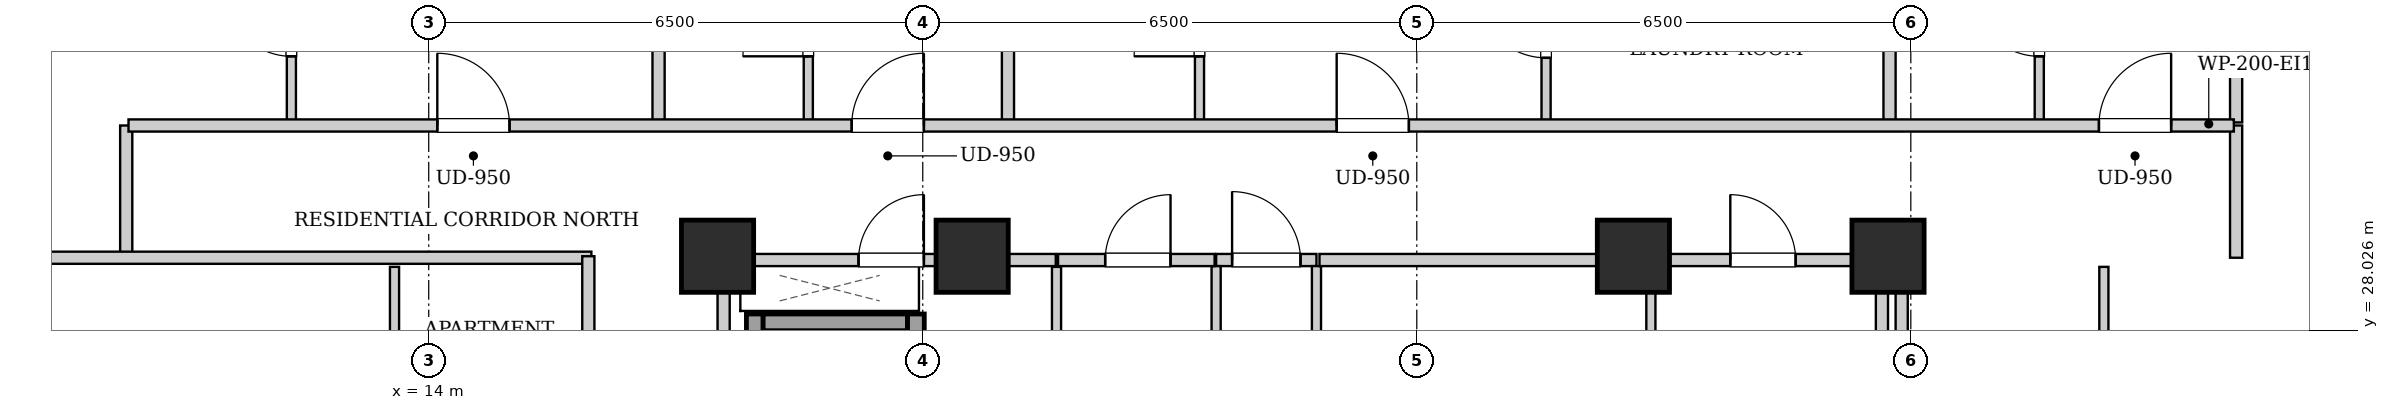
"""IFC4 building model, lengths in metres.
Left out: names, types, materials, properties, quantities, classifications, styles, units other than length and angle.
Written with IfcOpenShell. Run it as: python <this file> out.ifc"""

import sys

from ifc_helpers import new_model, si_unit, direction, frame, frame_2d, origin, origin_2d, place, context, subcontext, project, spatial, rectangle, extrude, element, fill, save


model = new_model("IFC4")
c1 = context("Model", 3, precision=1e-05, world=origin(), true_north=direction((0.0, 1.0)))
c2 = subcontext(c1, "Body", "Model", "MODEL_VIEW")
j1 = project(units=[si_unit("LENGTHUNIT", "METRE"), si_unit("PLANEANGLEUNIT", "RADIAN")], contexts=[c1])
p1 = place(None, origin())
s1 = spatial("IfcSite", under=j1, at=p1, CompositionType="ELEMENT")
p2 = place(p1, origin())
s2 = spatial("IfcBuilding", under=s1, at=p2, CompositionType="ELEMENT")
p3 = place(p2, frame((0.0, 0.0, 147.15)))
s3 = spatial("IfcBuildingStorey", under=s2, at=p3, CompositionType="ELEMENT", Elevation=147.15)
for number, where, z_axis, x_axis in (
    (1, (17.8, 29.0, 0.0), (0.0, 0.0, 1.0), (1.0, 0.0, 0.0)),
    (2, (21.15, 29.0, 0.0), (0.0, 0.0, 1.0), (1.0, 0.0, 0.0)),
    (3, (29.85, 29.0, 0.0), (0.0, 0.0, 1.0), (1.0, 0.0, 0.0)),
    (4, (33.2, 29.0, 0.0), (0.0, 0.0, 1.0), (1.0, 0.0, 0.0)),
):
    element("IfcColumn", number, at=place(p3, frame(where, z_axis=z_axis, x_axis=x_axis)), inside=s3, PredefinedType="COLUMN", context=c2, shape_type="SweptSolid", body=[
        extrude(rectangle(XDim=0.95, YDim=0.95, at=origin_2d()), origin(), (0.0, 0.0, 1.0), 3.25),
    ])
p4 = place(p3, frame((18.29, 24.1, 0.0), z_axis=(0.0, 0.0, 1.0), x_axis=(0.0, 1.0, 0.0)))
e5 = element("IfcWall", 5, at=p4, inside=s3, PredefinedType="SHEAR", context=c2, shape_type="SweptSolid", body=[
    extrude(rectangle(XDim=4.14, YDim=0.22, at=frame_2d((2.07, 0.0))), origin(), (0.0, 0.0, 1.0), 2.99),
])
p5 = place(p3, frame((18.4, 28.13, 0.0), z_axis=(0.0, 0.0, 1.0), x_axis=(1.0, 0.0, 0.0)))
e6 = element("IfcWall", 6, at=p5, inside=s3, PredefinedType="SHEAR", context=c2, shape_type="SweptSolid", body=[
    extrude(rectangle(XDim=1.9, YDim=0.22, at=frame_2d((0.95, 0.0))), origin(), (0.0, 0.0, 1.0), 2.99),
])
p6 = place(p3, frame((20.41, 26.06, 0.0), z_axis=(0.0, 0.0, 1.0), x_axis=(0.0, 1.0, 0.0)))
e7 = element("IfcWall", 7, at=p6, inside=s3, PredefinedType="SHEAR", context=c2, shape_type="SweptSolid", body=[
    extrude(rectangle(XDim=2.18, YDim=0.22, at=frame_2d((1.09, 0.0))), origin(), (0.0, 0.0, 1.0), 2.99),
])
for number, where, z_axis, x_axis in (
    (8, (17.88, 24.12, 0.0), (0.0, 0.0, 1.0), (0.0, 1.0, 0.0)),
    (9, (33.12, 24.12, 0.0), (0.0, 0.0, 1.0), (0.0, 1.0, 0.0)),
):
    element("IfcWall", number, at=place(p3, frame(where, z_axis=z_axis, x_axis=x_axis)), inside=s3, PredefinedType="PARTITIONING", context=c2, shape_type="SweptSolid", body=[
        extrude(rectangle(XDim=4.76, YDim=0.16, at=frame_2d((2.38, 0.0))), origin(), (0.0, 0.0, 1.0), 2.325),
    ])
p7 = place(p3, frame((24.36, 28.95, 0.0), z_axis=(0.0, 0.0, 1.0), x_axis=(1.0, 0.0, 0.0)))
e10 = element("IfcWall", 10, at=p7, inside=s3, PredefinedType="PARTITIONING", context=c2, shape_type="SweptSolid", body=[
    extrude(rectangle(XDim=1.32, YDim=0.16, at=frame_2d((0.66, 0.0))), origin(), (0.0, 0.0, 1.0), 2.442),
])
p8 = place(p7, frame((0.21, 0.0, 0.0)))
e11 = element("IfcOpeningElement", 11, at=p8, cuts=e10, PredefinedType="OPENING", context=c2, shape_type="SweptSolid", body=[
    extrude(rectangle(XDim=0.9, YDim=2.05, at=frame_2d((0.45, 1.025))), frame((0.0, 0.09, 0.0), z_axis=(0.0, -1.0, 0.0), x_axis=(1.0, 0.0, 0.0)), (0.0, 0.0, 1.0), 0.18),
])
p9 = place(p3, frame((17.96, 28.95, 0.0), z_axis=(0.0, 0.0, 1.0), x_axis=(1.0, 0.0, 0.0)))
e12 = element("IfcWall", 12, at=p9, inside=s3, PredefinedType="PARTITIONING", context=c2, shape_type="SweptSolid", body=[
    extrude(rectangle(XDim=4.29, YDim=0.16, at=frame_2d((2.145, 0.0))), origin(), (0.0, 0.0, 1.0), 2.442),
])
p10 = place(p9, frame((1.695, 0.0, 0.0)))
e13 = element("IfcOpeningElement", 13, at=p10, cuts=e12, PredefinedType="OPENING", context=c2, shape_type="SweptSolid", body=[
    extrude(rectangle(XDim=0.86, YDim=2.05, at=frame_2d((0.43, 1.025))), frame((0.0, 0.09, 0.0), z_axis=(0.0, -1.0, 0.0), x_axis=(1.0, 0.0, 0.0)), (0.0, 0.0, 1.0), 0.18),
])
for number, where, z_axis, x_axis in (
    (14, (24.36, 25.0, 0.0), (0.0, 0.0, 1.0), (0.0, 1.0, 0.0)),
    (15, (25.68, 25.0, 0.0), (0.0, 0.0, 1.0), (0.0, 1.0, 0.0)),
):
    element("IfcWall", number, at=place(p3, frame(where, z_axis=z_axis, x_axis=x_axis)), inside=s3, PredefinedType="PARTITIONING", context=c2, shape_type="SweptSolid", body=[
        extrude(rectangle(XDim=3.87, YDim=0.12, at=frame_2d((1.935, 0.0))), origin(), (0.0, 0.0, 1.0), 2.99),
    ])
p11 = place(p3, frame((30.08, 26.18, 0.0), z_axis=(0.0, 0.0, 1.0), x_axis=(0.0, 1.0, 0.0)))
e16 = element("IfcWall", 16, at=p11, inside=s3, PredefinedType="PARTITIONING", context=c2, shape_type="SweptSolid", body=[
    extrude(rectangle(XDim=2.68, YDim=0.12, at=frame_2d((1.34, 0.0))), origin(), (0.0, 0.0, 1.0), 2.99),
])
p12 = place(p3, frame((30.08, 28.95, 0.0), z_axis=(0.0, 0.0, 1.0), x_axis=(1.0, 0.0, 0.0)))
e17 = element("IfcWall", 17, at=p12, inside=s3, PredefinedType="PARTITIONING", context=c2, shape_type="SweptSolid", body=[
    extrude(rectangle(XDim=2.96, YDim=0.16, at=frame_2d((1.48, 0.0))), origin(), (0.0, 0.0, 1.0), 2.99),
])
p13 = place(p12, frame((1.045, 0.0, 0.0)))
e18 = element("IfcOpeningElement", 18, at=p13, cuts=e17, PredefinedType="OPENING", context=c2, shape_type="SweptSolid", body=[
    extrude(rectangle(XDim=0.86, YDim=2.05, at=frame_2d((0.43, 1.025))), frame((0.0, 0.09, 0.0), z_axis=(0.0, -1.0, 0.0), x_axis=(1.0, 0.0, 0.0)), (0.0, 0.0, 1.0), 0.18),
])
p14 = place(p3, frame((22.26, 25.0, 0.0), z_axis=(0.0, 0.0, 1.0), x_axis=(0.0, 1.0, 0.0)))
e19 = element("IfcWall", 19, at=p14, inside=s3, PredefinedType="PARTITIONING", context=c2, shape_type="SweptSolid", body=[
    extrude(rectangle(XDim=3.86, YDim=0.12, at=frame_2d((1.93, 0.0))), origin(), (0.0, 0.0, 1.0), 2.99),
])
p15 = place(p3, frame((22.28, 28.95, 0.0), z_axis=(0.0, 0.0, 1.0), x_axis=(1.0, 0.0, 0.0)))
e20 = element("IfcWall", 20, at=p15, inside=s3, PredefinedType="PARTITIONING", context=c2, shape_type="SweptSolid", body=[
    extrude(rectangle(XDim=2.06, YDim=0.16, at=frame_2d((1.03, 0.0))), origin(), (0.0, 0.0, 1.0), 2.442),
])
p16 = place(p15, frame((0.62, 0.0, 0.0)))
e21 = element("IfcOpeningElement", 21, at=p16, cuts=e20, PredefinedType="OPENING", context=c2, shape_type="SweptSolid", body=[
    extrude(rectangle(XDim=0.86, YDim=2.05, at=frame_2d((0.43, 1.025))), frame((0.0, 0.09, 0.0), z_axis=(0.0, -1.0, 0.0), x_axis=(1.0, 0.0, 0.0)), (0.0, 0.0, 1.0), 0.18),
])
p17 = place(p3, frame((25.72, 28.95, 0.0), z_axis=(0.0, 0.0, 1.0), x_axis=(1.0, 0.0, 0.0)))
e22 = element("IfcWall", 22, at=p17, inside=s3, PredefinedType="PARTITIONING", context=c2, shape_type="SweptSolid", body=[
    extrude(rectangle(XDim=4.32, YDim=0.16, at=frame_2d((2.16, 0.0))), origin(), (0.0, 0.0, 1.0), 2.442),
])
for number, where, z_axis, x_axis in (
    (23, (10.02, 28.98, 0.0), (0.0, 0.0, 1.0), (0.0, 1.0, 0.0)),
    (24, (37.78, 28.98, 0.0), (0.0, 0.0, 1.0), (0.0, 1.0, 0.0)),
):
    element("IfcWall", number, at=place(p3, frame(where, z_axis=z_axis, x_axis=x_axis)), inside=s3, PredefinedType="PARTITIONING", context=c2, shape_type="SweptSolid", body=[
        extrude(rectangle(XDim=1.74, YDim=0.16, at=frame_2d((0.87, 0.0))), origin(), (0.0, 0.0, 1.0), 2.99),
    ])
p18 = place(p3, frame((7.78, 28.98, 0.0), z_axis=(0.0, 0.0, 1.0), x_axis=(1.0, 0.0, 0.0)))
e25 = element("IfcWall", 25, at=p18, inside=s3, PredefinedType="PARTITIONING", context=c2, shape_type="SweptSolid", body=[
    extrude(rectangle(XDim=8.36, YDim=0.16, at=frame_2d((4.18, 0.0))), origin(), (0.0, 0.0, 1.0), 2.442),
])
p19 = place(p3, frame((12.193, 30.76, 0.0), z_axis=(0.0, 0.0, 1.0), x_axis=(0.0, 1.0, 0.0)))
e26 = element("IfcWall", 26, at=p19, inside=s3, PredefinedType="PARTITIONING", context=c2, shape_type="SweptSolid", body=[
    extrude(rectangle(XDim=2.6, YDim=0.12, at=frame_2d((1.3, 0.0))), origin(), (0.0, 0.0, 1.0), 2.99),
])
p20 = place(p19, frame((0.87, 0.0, 0.0)))
e27 = element("IfcOpeningElement", 27, at=p20, cuts=e26, PredefinedType="OPENING", context=c2, shape_type="SweptSolid", body=[
    extrude(rectangle(XDim=0.86, YDim=2.05, at=frame_2d((0.43, 1.025))), frame((0.0, 0.07, 0.0), z_axis=(0.0, -1.0, 0.0), x_axis=(1.0, 0.0, 0.0)), (0.0, 0.0, 1.0), 0.14),
])
p21 = place(p3, frame((17.024, 30.76, 0.0), z_axis=(0.0, 0.0, 1.0), x_axis=(0.0, 1.0, 0.0)))
e28 = element("IfcWall", 28, at=p21, inside=s3, PredefinedType="PARTITIONING", context=c2, shape_type="SweptSolid", body=[
    extrude(rectangle(XDim=12.26, YDim=0.16, at=frame_2d((6.13, 0.0))), origin(), (0.0, 0.0, 1.0), 2.99),
])
p22 = place(p3, frame((18.994, 30.76, 0.0), z_axis=(0.0, 0.0, 1.0), x_axis=(0.0, 1.0, 0.0)))
e29 = element("IfcWall", 29, at=p22, inside=s3, PredefinedType="PARTITIONING", context=c2, shape_type="SweptSolid", body=[
    extrude(rectangle(XDim=2.6, YDim=0.12, at=frame_2d((1.3, 0.0))), origin(), (0.0, 0.0, 1.0), 2.99),
])
p23 = place(p22, frame((0.87, 0.0, 0.0)))
e30 = element("IfcOpeningElement", 30, at=p23, cuts=e29, PredefinedType="OPENING", context=c2, shape_type="SweptSolid", body=[
    extrude(rectangle(XDim=0.86, YDim=2.05, at=frame_2d((0.43, 1.025))), frame((0.0, 0.07, 0.0), z_axis=(0.0, -1.0, 0.0), x_axis=(1.0, 0.0, 0.0)), (0.0, 0.0, 1.0), 0.14),
])
p24 = place(p3, frame((21.621, 30.76, 0.0), z_axis=(0.0, 0.0, 1.0), x_axis=(0.0, 1.0, 0.0)))
e31 = element("IfcWall", 31, at=p24, inside=s3, PredefinedType="PARTITIONING", context=c2, shape_type="SweptSolid", body=[
    extrude(rectangle(XDim=12.26, YDim=0.16, at=frame_2d((6.13, 0.0))), origin(), (0.0, 0.0, 1.0), 2.99),
])
p25 = place(p3, frame((24.141, 30.76, 0.0), z_axis=(0.0, 0.0, 1.0), x_axis=(0.0, 1.0, 0.0)))
e32 = element("IfcWall", 32, at=p25, inside=s3, PredefinedType="PARTITIONING", context=c2, shape_type="SweptSolid", body=[
    extrude(rectangle(XDim=2.6, YDim=0.12, at=frame_2d((1.3, 0.0))), origin(), (0.0, 0.0, 1.0), 2.99),
])
p26 = place(p25, frame((0.87, 0.0, 0.0)))
e33 = element("IfcOpeningElement", 33, at=p26, cuts=e32, PredefinedType="OPENING", context=c2, shape_type="SweptSolid", body=[
    extrude(rectangle(XDim=0.86, YDim=2.05, at=frame_2d((0.43, 1.025))), frame((0.0, 0.07, 0.0), z_axis=(0.0, -1.0, 0.0), x_axis=(1.0, 0.0, 0.0)), (0.0, 0.0, 1.0), 0.14),
])
p27 = place(p3, frame((28.701, 30.76, 0.0), z_axis=(0.0, 0.0, 1.0), x_axis=(0.0, 1.0, 0.0)))
e34 = element("IfcWall", 34, at=p27, inside=s3, PredefinedType="PARTITIONING", context=c2, shape_type="SweptSolid", body=[
    extrude(rectangle(XDim=2.6, YDim=0.12, at=frame_2d((1.3, 0.0))), origin(), (0.0, 0.0, 1.0), 2.99),
])
p28 = place(p27, frame((0.85, 0.0, 0.0)))
e35 = element("IfcOpeningElement", 35, at=p28, cuts=e34, PredefinedType="OPENING", context=c2, shape_type="SweptSolid", body=[
    extrude(rectangle(XDim=0.9, YDim=2.05, at=frame_2d((0.45, 1.025))), frame((0.0, 0.07, 0.0), z_axis=(0.0, -1.0, 0.0), x_axis=(1.0, 0.0, 0.0)), (0.0, 0.0, 1.0), 0.14),
])
p29 = place(p3, frame((37.78, 30.76, 0.0), z_axis=(0.0, 0.0, 1.0), x_axis=(0.0, 1.0, 0.0)))
e36 = element("IfcWall", 36, at=p29, inside=s3, PredefinedType="PARTITIONING", context=c2, shape_type="SweptSolid", body=[
    extrude(rectangle(XDim=2.66, YDim=0.16, at=frame_2d((1.33, 0.0))), origin(), (0.0, 0.0, 1.0), 2.99),
])
p30 = place(p3, frame((33.22, 30.76, 0.0), z_axis=(0.0, 0.0, 1.0), x_axis=(0.0, 1.0, 0.0)))
e37 = element("IfcWall", 37, at=p30, inside=s3, PredefinedType="PARTITIONING", context=c2, shape_type="SweptSolid", body=[
    extrude(rectangle(XDim=10.28, YDim=0.16, at=frame_2d((5.14, 0.0))), origin(), (0.0, 0.0, 1.0), 2.442),
])
p31 = place(p3, frame((35.19, 30.76, 0.0), z_axis=(0.0, 0.0, 1.0), x_axis=(0.0, 1.0, 0.0)))
e38 = element("IfcWall", 38, at=p31, inside=s3, PredefinedType="PARTITIONING", context=c2, shape_type="SweptSolid", body=[
    extrude(rectangle(XDim=2.6, YDim=0.12, at=frame_2d((1.3, 0.0))), origin(), (0.0, 0.0, 1.0), 2.99),
])
p32 = place(p31, frame((0.87, 0.0, 0.0)))
e39 = element("IfcOpeningElement", 39, at=p32, cuts=e38, PredefinedType="OPENING", context=c2, shape_type="SweptSolid", body=[
    extrude(rectangle(XDim=0.86, YDim=2.05, at=frame_2d((0.43, 1.025))), frame((0.0, 0.07, 0.0), z_axis=(0.0, -1.0, 0.0), x_axis=(1.0, 0.0, 0.0)), (0.0, 0.0, 1.0), 0.14),
])
p33 = place(p3, frame((13.55, 23.527, 0.0), z_axis=(0.0, 0.0, 1.0), x_axis=(0.0, 1.0, 0.0)))
e40 = element("IfcWall", 40, at=p33, inside=s3, PredefinedType="PARTITIONING", context=c2, shape_type="SweptSolid", body=[
    extrude(rectangle(XDim=5.333, YDim=0.12, at=frame_2d((2.667, 0.0))), origin(), (0.0, 0.0, 1.0), 2.99),
])
p34 = place(p33, frame((2.216, 0.0, 0.0)))
e41 = element("IfcOpeningElement", 41, at=p34, cuts=e40, PredefinedType="OPENING", context=c2, shape_type="SweptSolid", body=[
    extrude(rectangle(XDim=0.9, YDim=2.05, at=frame_2d((0.45, 1.025))), frame((0.0, 0.07, 0.0), z_axis=(0.0, -1.0, 0.0), x_axis=(1.0, 0.0, 0.0)), (0.0, 0.0, 1.0), 0.14),
])
p35 = place(p3, frame((36.04, 24.552, 0.0), z_axis=(0.0, 0.0, 1.0), x_axis=(0.0, 1.0, 0.0)))
e42 = element("IfcWall", 42, at=p35, inside=s3, PredefinedType="PARTITIONING", context=c2, shape_type="SweptSolid", body=[
    extrude(rectangle(XDim=4.308, YDim=0.12, at=frame_2d((2.154, 0.0))), origin(), (0.0, 0.0, 1.0), 2.99),
])
p36 = place(p35, frame((1.704, 0.0, 0.0)))
e43 = element("IfcOpeningElement", 43, at=p36, cuts=e42, PredefinedType="OPENING", context=c2, shape_type="SweptSolid", body=[
    extrude(rectangle(XDim=0.9, YDim=2.05, at=frame_2d((0.45, 1.025))), frame((0.0, 0.07, 0.0), z_axis=(0.0, -1.0, 0.0), x_axis=(1.0, 0.0, 0.0)), (0.0, 0.0, 1.0), 0.14),
])
p37 = place(p3, frame((10.05, 30.72, 0.0), z_axis=(0.0, 0.0, 1.0), x_axis=(1.0, 0.0, 0.0)))
e44 = element("IfcWall", 44, at=p37, inside=s3, PredefinedType="PARTITIONING", context=c2, shape_type="SweptSolid", body=[
    extrude(rectangle(XDim=27.7, YDim=0.16, at=frame_2d((13.85, 0.0))), origin(), (0.0, 0.0, 1.0), 2.99),
])
p38 = place(p37, frame((4.063, 0.0, 0.0)))
e45 = element("IfcOpeningElement", 45, at=p38, cuts=e44, PredefinedType="OPENING", context=c2, shape_type="SweptSolid", body=[
    extrude(rectangle(XDim=0.95, YDim=2.1, at=frame_2d((0.475, 1.05))), frame((0.0, 0.09, 0.0), z_axis=(0.0, -1.0, 0.0), x_axis=(1.0, 0.0, 0.0)), (0.0, 0.0, 1.0), 0.18),
])
p39 = place(p37, frame((9.515, 0.0, 0.0)))
e46 = element("IfcOpeningElement", 46, at=p39, cuts=e44, PredefinedType="OPENING", context=c2, shape_type="SweptSolid", body=[
    extrude(rectangle(XDim=0.95, YDim=2.1, at=frame_2d((0.475, 1.05))), frame((0.0, 0.09, 0.0), z_axis=(0.0, -1.0, 0.0), x_axis=(1.0, 0.0, 0.0)), (0.0, 0.0, 1.0), 0.18),
])
p40 = place(p37, frame((15.896, 0.0, 0.0)))
e47 = element("IfcOpeningElement", 47, at=p40, cuts=e44, PredefinedType="OPENING", context=c2, shape_type="SweptSolid", body=[
    extrude(rectangle(XDim=0.95, YDim=2.1, at=frame_2d((0.475, 1.05))), frame((0.0, 0.09, 0.0), z_axis=(0.0, -1.0, 0.0), x_axis=(1.0, 0.0, 0.0)), (0.0, 0.0, 1.0), 0.18),
])
p41 = place(p37, frame((25.925, 0.0, 0.0)))
e48 = element("IfcOpeningElement", 48, at=p41, cuts=e44, PredefinedType="OPENING", context=c2, shape_type="SweptSolid", body=[
    extrude(rectangle(XDim=0.95, YDim=2.1, at=frame_2d((0.475, 1.05))), frame((0.0, 0.09, 0.0), z_axis=(0.0, -1.0, 0.0), x_axis=(1.0, 0.0, 0.0)), (0.0, 0.0, 1.0), 0.18),
])
p42 = place(p3, frame((16.1, 15.07, 0.0), z_axis=(0.0, 0.0, 1.0), x_axis=(0.0, 1.0, 0.0)))
e49 = element("IfcWall", 49, at=p42, inside=s3, PredefinedType="PARTITIONING", context=c2, shape_type="SweptSolid", body=[
    extrude(rectangle(XDim=13.93, YDim=0.16, at=frame_2d((6.965, 0.0))), origin(), (0.0, 0.0, 1.0), 2.99),
])
p43 = place(p42, frame((3.608, 0.0, 0.0)))
e50 = element("IfcOpeningElement", 50, at=p43, cuts=e49, PredefinedType="OPENING", context=c2, shape_type="SweptSolid", body=[
    extrude(rectangle(XDim=0.95, YDim=2.1, at=frame_2d((0.475, 1.05))), frame((0.0, 0.09, 0.0), z_axis=(0.0, -1.0, 0.0), x_axis=(1.0, 0.0, 0.0)), (0.0, 0.0, 1.0), 0.18),
])
p44 = place(p42, frame((10.649, 0.0, 0.0)))
e51 = element("IfcOpeningElement", 51, at=p44, cuts=e49, PredefinedType="OPENING", context=c2, shape_type="SweptSolid", body=[
    extrude(rectangle(XDim=0.95, YDim=2.1, at=frame_2d((0.475, 1.05))), frame((0.0, 0.09, 0.0), z_axis=(0.0, -1.0, 0.0), x_axis=(1.0, 0.0, 0.0)), (0.0, 0.0, 1.0), 0.18),
])
p45 = place(p3, frame((33.38, 15.02, 0.0), z_axis=(0.0, 0.0, 1.0), x_axis=(0.0, 1.0, 0.0)))
e52 = element("IfcWall", 52, at=p45, inside=s3, PredefinedType="PARTITIONING", context=c2, shape_type="SweptSolid", body=[
    extrude(rectangle(XDim=13.98, YDim=0.16, at=frame_2d((6.99, 0.0))), origin(), (0.0, 0.0, 1.0), 2.325),
])
p46 = place(p8, origin())
e53 = element("IfcDoor", 53, at=p46, inside=s3, OperationType="SINGLE_SWING_LEFT", PredefinedType="DOOR", context=c2, shape_type="SweptSolid", body=[
    extrude(rectangle(XDim=0.9, YDim=2.05, at=frame_2d((0.45, 1.025))), frame((0.0, 0.025, 0.0), z_axis=(0.0, -1.0, 0.0), x_axis=(1.0, 0.0, 0.0)), (0.0, 0.0, 1.0), 0.05),
])
fill(e11, e53)
p47 = place(p10, origin())
e54 = element("IfcDoor", 54, at=p47, inside=s3, OperationType="SINGLE_SWING_RIGHT", PredefinedType="DOOR", context=c2, shape_type="SweptSolid", body=[
    extrude(rectangle(XDim=0.86, YDim=2.05, at=frame_2d((0.43, 1.025))), frame((0.0, 0.025, 0.0), z_axis=(0.0, -1.0, 0.0), x_axis=(1.0, 0.0, 0.0)), (0.0, 0.0, 1.0), 0.05),
])
fill(e13, e54)
p48 = place(p13, origin())
e55 = element("IfcDoor", 55, at=p48, inside=s3, OperationType="SINGLE_SWING_LEFT", PredefinedType="DOOR", context=c2, shape_type="SweptSolid", body=[
    extrude(rectangle(XDim=0.86, YDim=2.05, at=frame_2d((0.43, 1.025))), frame((0.0, 0.025, 0.0), z_axis=(0.0, -1.0, 0.0), x_axis=(1.0, 0.0, 0.0)), (0.0, 0.0, 1.0), 0.05),
])
fill(e18, e55)
p49 = place(p16, origin())
e56 = element("IfcDoor", 56, at=p49, inside=s3, OperationType="SINGLE_SWING_RIGHT", PredefinedType="DOOR", context=c2, shape_type="SweptSolid", body=[
    extrude(rectangle(XDim=0.86, YDim=2.05, at=frame_2d((0.43, 1.025))), frame((0.0, 0.025, 0.0), z_axis=(0.0, -1.0, 0.0), x_axis=(1.0, 0.0, 0.0)), (0.0, 0.0, 1.0), 0.05),
])
fill(e21, e56)
p50 = place(p20, origin())
e57 = element("IfcDoor", 57, at=p50, inside=s3, OperationType="SINGLE_SWING_RIGHT", PredefinedType="DOOR", context=c2, shape_type="SweptSolid", body=[
    extrude(rectangle(XDim=0.86, YDim=2.05, at=frame_2d((0.43, 1.025))), frame((0.0, 0.025, 0.0), z_axis=(0.0, -1.0, 0.0), x_axis=(1.0, 0.0, 0.0)), (0.0, 0.0, 1.0), 0.05),
])
fill(e27, e57)
p51 = place(p23, origin())
e58 = element("IfcDoor", 58, at=p51, inside=s3, OperationType="SINGLE_SWING_LEFT", PredefinedType="DOOR", context=c2, shape_type="SweptSolid", body=[
    extrude(rectangle(XDim=0.86, YDim=2.05, at=frame_2d((0.43, 1.025))), frame((0.0, 0.025, 0.0), z_axis=(0.0, -1.0, 0.0), x_axis=(1.0, 0.0, 0.0)), (0.0, 0.0, 1.0), 0.05),
])
fill(e30, e58)
p52 = place(p26, origin())
e59 = element("IfcDoor", 59, at=p52, inside=s3, OperationType="SINGLE_SWING_LEFT", PredefinedType="DOOR", context=c2, shape_type="SweptSolid", body=[
    extrude(rectangle(XDim=0.86, YDim=2.05, at=frame_2d((0.43, 1.025))), frame((0.0, 0.025, 0.0), z_axis=(0.0, -1.0, 0.0), x_axis=(1.0, 0.0, 0.0)), (0.0, 0.0, 1.0), 0.05),
])
fill(e33, e59)
p53 = place(p28, origin())
e60 = element("IfcDoor", 60, at=p53, inside=s3, OperationType="SINGLE_SWING_RIGHT", PredefinedType="DOOR", context=c2, shape_type="SweptSolid", body=[
    extrude(rectangle(XDim=0.9, YDim=2.05, at=frame_2d((0.45, 1.025))), frame((0.0, 0.025, 0.0), z_axis=(0.0, -1.0, 0.0), x_axis=(1.0, 0.0, 0.0)), (0.0, 0.0, 1.0), 0.05),
])
fill(e35, e60)
p54 = place(p32, origin())
e61 = element("IfcDoor", 61, at=p54, inside=s3, OperationType="SINGLE_SWING_RIGHT", PredefinedType="DOOR", context=c2, shape_type="SweptSolid", body=[
    extrude(rectangle(XDim=0.86, YDim=2.05, at=frame_2d((0.43, 1.025))), frame((0.0, 0.025, 0.0), z_axis=(0.0, -1.0, 0.0), x_axis=(1.0, 0.0, 0.0)), (0.0, 0.0, 1.0), 0.05),
])
fill(e39, e61)
p55 = place(p38, origin())
e62 = element("IfcDoor", 62, at=p55, inside=s3, OperationType="SINGLE_SWING_LEFT", PredefinedType="DOOR", context=c2, shape_type="SweptSolid", body=[
    extrude(rectangle(XDim=0.95, YDim=2.1, at=frame_2d((0.475, 1.05))), frame((0.0, 0.025, 0.0), z_axis=(0.0, -1.0, 0.0), x_axis=(1.0, 0.0, 0.0)), (0.0, 0.0, 1.0), 0.05),
])
fill(e45, e62)
p56 = place(p39, origin())
e63 = element("IfcDoor", 63, at=p56, inside=s3, OperationType="SINGLE_SWING_RIGHT", PredefinedType="DOOR", context=c2, shape_type="SweptSolid", body=[
    extrude(rectangle(XDim=0.95, YDim=2.1, at=frame_2d((0.475, 1.05))), frame((0.0, 0.025, 0.0), z_axis=(0.0, -1.0, 0.0), x_axis=(1.0, 0.0, 0.0)), (0.0, 0.0, 1.0), 0.05),
])
fill(e46, e63)
p57 = place(p40, origin())
e64 = element("IfcDoor", 64, at=p57, inside=s3, OperationType="SINGLE_SWING_LEFT", PredefinedType="DOOR", context=c2, shape_type="SweptSolid", body=[
    extrude(rectangle(XDim=0.95, YDim=2.1, at=frame_2d((0.475, 1.05))), frame((0.0, 0.025, 0.0), z_axis=(0.0, -1.0, 0.0), x_axis=(1.0, 0.0, 0.0)), (0.0, 0.0, 1.0), 0.05),
])
fill(e47, e64)
p58 = place(p41, origin())
e65 = element("IfcDoor", 65, at=p58, inside=s3, OperationType="SINGLE_SWING_RIGHT", PredefinedType="DOOR", context=c2, shape_type="SweptSolid", body=[
    extrude(rectangle(XDim=0.95, YDim=2.1, at=frame_2d((0.475, 1.05))), frame((0.0, 0.025, 0.0), z_axis=(0.0, -1.0, 0.0), x_axis=(1.0, 0.0, 0.0)), (0.0, 0.0, 1.0), 0.05),
])
fill(e48, e65)
save(model, sys.argv[1])
